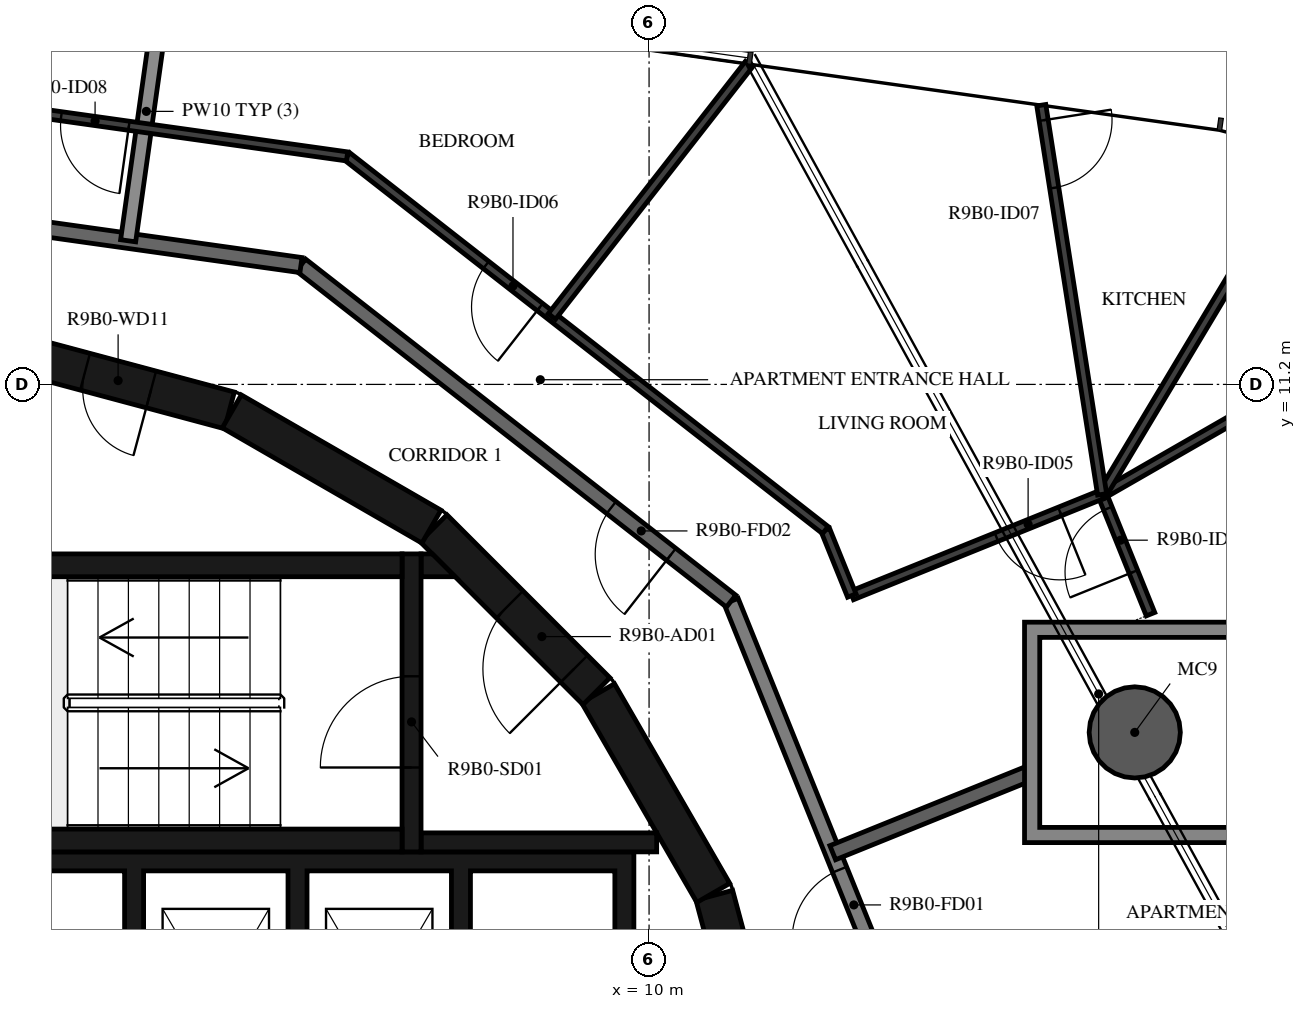
"""IFC4 building model, lengths in metres.
Left out: names, types, materials, properties, quantities, classifications, styles, units other than length and angle.
Written with IfcOpenShell. Run it as: python <this file> out.ifc"""

import sys

from ifc_helpers import new_model, si_unit, direction, frame, frame_2d, origin, origin_2d, place, context, subcontext, project, spatial, polyline, rectangle, hollow_circle, outline, extrude, element, fill, save


model = new_model("IFC4")
c1 = context("Model", 3, precision=1e-05, world=origin(), true_north=direction((0.0, 1.0)))
c2 = subcontext(c1, "Body", "Model", "MODEL_VIEW")
j1 = project(units=[si_unit("LENGTHUNIT", "METRE"), si_unit("PLANEANGLEUNIT", "RADIAN")], contexts=[c1])
p1 = place(None, origin())
s1 = spatial("IfcSite", under=j1, at=p1, CompositionType="ELEMENT")
p2 = place(p1, origin())
s2 = spatial("IfcBuilding", under=s1, at=p2, CompositionType="ELEMENT")
p3 = place(p2, frame((0.0, 0.0, 347.0)))
s3 = spatial("IfcBuildingStorey", under=s2, at=p3, CompositionType="ELEMENT", Elevation=347.0)
p4 = place(p3, frame((16.39, 6.622, -0.38), z_axis=(0.0, 0.0, 1.0), x_axis=(1.0, 0.0, 0.0)))
e1 = element("IfcColumn", 1, at=p4, inside=s3, PredefinedType="COLUMN", context=c2, shape_type="SweptSolid", body=[
    extrude(hollow_circle(Radius=0.6, WallThickness=0.03, at=origin_2d()), origin(), (0.0, 0.0, 1.0), 3.5),
])
for number, where, z_axis, x_axis in (
    (2, (11.643, 1.55, 0.0), (0.0, 0.0, 1.0), (-0.259, 0.966, 0.0)),
    (3, (10.845, 4.51, 0.0), (0.0, 0.0, 1.0), (-0.5, 0.866, 0.0)),
):
    element("IfcWall", number, at=place(p3, frame(where, z_axis=z_axis, x_axis=x_axis)), inside=s3, PredefinedType="SHEAR", context=c2, shape_type="SweptSolid", body=[
        extrude(rectangle(XDim=3.033, YDim=0.5, at=frame_2d((1.516, 0.0))), origin(), (0.0, 0.0, 1.0), 3.12),
    ])
p5 = place(p3, frame((9.308, 7.164, 0.0), z_axis=(0.0, 0.0, 1.0), x_axis=(-0.707106781187, 0.707106781187, 0.0)))
e4 = element("IfcWall", 4, at=p5, inside=s3, PredefinedType="SHEAR", context=c2, shape_type="SweptSolid", body=[
    extrude(rectangle(XDim=3.032, YDim=0.5, at=frame_2d((1.516, 0.0))), origin(), (0.0, 0.0, 1.0), 3.12),
])
p6 = place(p5, frame((0.416, 0.0, 0.0)))
e5 = element("IfcOpeningElement", 5, at=p6, cuts=e4, PredefinedType="OPENING", context=c2, shape_type="SweptSolid", body=[
    extrude(rectangle(XDim=1.2, YDim=2.1, at=frame_2d((0.6, 1.05))), frame((0.0, 0.26, 0.0), z_axis=(0.0, -1.0, 0.0), x_axis=(1.0, 0.0, 0.0)), (0.0, 0.0, 1.0), 0.52),
])
p7 = place(p3, frame((7.137, 9.329, 0.0), z_axis=(0.0, 0.0, 1.0), x_axis=(-0.865975092491, 0.500087131594, 0.0)))
e6 = element("IfcWall", 6, at=p7, inside=s3, PredefinedType="SHEAR", context=c2, shape_type="SweptSolid", body=[
    extrude(rectangle(XDim=3.033, YDim=0.5, at=frame_2d((1.516, 0.0))), origin(), (0.0, 0.0, 1.0), 3.12),
])
p8 = place(p3, frame((4.479, 10.858, 0.0), z_axis=(0.0, 0.0, 1.0), x_axis=(-0.965948410781, 0.258734743916, 0.0)))
e7 = element("IfcWall", 7, at=p8, inside=s3, PredefinedType="SHEAR", context=c2, shape_type="SweptSolid", body=[
    extrude(rectangle(XDim=3.033, YDim=0.5, at=frame_2d((1.516, 0.0))), origin(), (0.0, 0.0, 1.0), 3.12),
])
p9 = place(p8, frame((1.066, 0.0, 0.0)))
e8 = element("IfcOpeningElement", 8, at=p9, cuts=e7, PredefinedType="OPENING", context=c2, shape_type="SweptSolid", body=[
    extrude(rectangle(XDim=0.9, YDim=2.1, at=frame_2d((0.45, 1.05))), frame((0.0, 0.26, 0.0), z_axis=(0.0, -1.0, 0.0), x_axis=(1.0, 0.0, 0.0)), (0.0, 0.0, 1.0), 0.52),
])
for number, where, z_axis, x_axis in (
    (9, (0.0, 5.2, 0.0), (0.0, 0.0, 1.0), (1.0, 0.0, 0.0)),
    (10, (0.0, 8.82, 0.0), (0.0, 0.0, 1.0), (1.0, 0.0, 0.0)),
):
    element("IfcWall", number, at=place(p3, frame(where, z_axis=z_axis, x_axis=x_axis)), inside=s3, PredefinedType="SHEAR", context=c2, shape_type="SweptSolid", body=[
        extrude(rectangle(XDim=6.75, YDim=0.3, at=frame_2d((3.375, 0.0))), origin(), (0.0, 0.0, 1.0), 3.12),
    ])
p10 = place(p3, frame((6.875, 5.05, 0.0), z_axis=(0.0, 0.0, 1.0), x_axis=(0.0, 1.0, 0.0)))
e11 = element("IfcWall", 11, at=p10, inside=s3, PredefinedType="SHEAR", context=c2, shape_type="SweptSolid", body=[
    extrude(rectangle(XDim=3.92, YDim=0.25, at=frame_2d((1.96, 0.0))), origin(), (0.0, 0.0, 1.0), 3.12),
])
p11 = place(p10, frame((1.11, 0.0, 0.0)))
e12 = element("IfcOpeningElement", 12, at=p11, cuts=e11, PredefinedType="OPENING", context=c2, shape_type="SweptSolid", body=[
    extrude(rectangle(XDim=1.2, YDim=2.1, at=frame_2d((0.6, 1.05))), frame((0.0, 0.135, 0.0), z_axis=(0.0, -1.0, 0.0), x_axis=(1.0, 0.0, 0.0)), (0.0, 0.0, 1.0), 0.27),
])
p12 = place(p3, frame((7.0, 5.175, 0.0), z_axis=(0.0, 0.0, 1.0), x_axis=(1.0, 0.0, 0.0)))
e13 = element("IfcWall", 13, at=p12, inside=s3, PredefinedType="SHEAR", context=c2, shape_type="SweptSolid", body=[
    extrude(rectangle(XDim=3.1, YDim=0.25, at=frame_2d((1.55, 0.0))), origin(), (0.0, 0.0, 1.0), 3.12),
])
p13 = place(p3, origin())
e14 = element("IfcWall", 14, at=p13, inside=s3, PredefinedType="SHEAR", context=c2, shape_type="SweptSolid", body=[
    extrude(outline(polyline([(7.448, 8.67), (7.0, 8.67), (7.0, 8.97), (7.148, 8.97), (7.448, 8.67)])), origin(), (0.0, 0.0, 1.0), 3.12),
])
p14 = place(p3, origin())
e15 = element("IfcWall", 15, at=p14, inside=s3, PredefinedType="SHEAR", context=c2, shape_type="SweptSolid", body=[
    extrude(outline(polyline([(-9.8, 1.9), (-9.55, 1.9), (-9.55, 4.8), (-1.2, 4.8), (-1.2, 1.9), (-0.95, 1.9), (-0.95, 4.8), (3.1, 4.8), (3.1, 1.9), (3.35, 1.9), (3.35, 4.8), (5.25, 4.8), (5.25, 1.9), (5.5, 1.9), (5.5, 4.8), (7.4, 4.8), (7.4, 1.9), (7.65, 1.9), (7.65, 4.8), (9.55, 4.8), (9.55, 1.9), (9.8, 1.9), (9.8, 4.8), (9.8, 5.05), (-9.8, 5.05), (-9.8, 4.8), (-9.8, 1.9)])), origin(), (0.0, 0.0, 1.0), 3.12),
])
p15 = place(p3, frame((13.769, 1.691, 0.0), z_axis=(0.0, 0.0, 1.0), x_axis=(-0.374618189599, 0.92717916932, 0.0)))
e16 = element("IfcWall", 16, at=p15, inside=s3, PredefinedType="STANDARD", context=c2, shape_type="SweptSolid", body=[
    extrude(rectangle(XDim=7.181, YDim=0.2, at=frame_2d((3.591, 0.0))), origin(), (0.0, 0.0, 1.0), 3.12),
])
p16 = place(p15, frame((2.371, 0.0, 0.0)))
e17 = element("IfcOpeningElement", 17, at=p16, cuts=e16, PredefinedType="OPENING", context=c2, shape_type="SweptSolid", body=[
    extrude(rectangle(XDim=1.0, YDim=2.1, at=frame_2d((0.5, 1.05))), frame((0.0, 0.11, 0.0), z_axis=(0.0, -1.0, 0.0), x_axis=(1.0, 0.0, 0.0)), (0.0, 0.0, 1.0), 0.22),
])
p17 = place(p3, frame((11.079, 8.349, 0.0), z_axis=(0.0, 0.0, 1.0), x_axis=(-0.78800478687, 0.615669112324, 0.0)))
e18 = element("IfcWall", 18, at=p17, inside=s3, PredefinedType="STANDARD", context=c2, shape_type="SweptSolid", body=[
    extrude(rectangle(XDim=7.181, YDim=0.2, at=frame_2d((3.591, 0.0))), origin(), (0.0, 0.0, 1.0), 3.12),
])
p18 = place(p17, frame((1.0, 0.0, 0.0)))
e19 = element("IfcOpeningElement", 19, at=p18, cuts=e18, PredefinedType="OPENING", context=c2, shape_type="SweptSolid", body=[
    extrude(rectangle(XDim=1.0, YDim=2.1, at=frame_2d((0.5, 1.05))), frame((0.0, 0.11, 0.0), z_axis=(0.0, -1.0, 0.0), x_axis=(1.0, 0.0, 0.0)), (0.0, 0.0, 1.0), 0.22),
])
p19 = place(p3, frame((5.42, 12.77, 0.0), z_axis=(0.0, 0.0, 1.0), x_axis=(-0.990270565508, 0.139155334385, 0.0)))
e20 = element("IfcWall", 20, at=p19, inside=s3, PredefinedType="STANDARD", context=c2, shape_type="SweptSolid", body=[
    extrude(rectangle(XDim=7.181, YDim=0.2, at=frame_2d((3.59, 0.0))), origin(), (0.0, 0.0, 1.0), 3.12),
])
p20 = place(p3, frame((14.989, 6.079, 0.0), z_axis=(0.0, 0.0, 1.0), x_axis=(-0.927203056473, -0.374559063523, 0.0)))
e21 = element("IfcWall", 21, at=p20, inside=s3, PredefinedType="STANDARD", context=c2, shape_type="SweptSolid", body=[
    extrude(rectangle(XDim=2.775, YDim=0.2, at=frame_2d((1.387, 0.0))), origin(), (0.0, 0.0, 1.0), 3.12),
])
p21 = place(p3, frame((3.625, 16.494, 0.0), z_axis=(0.0, 0.0, 1.0), x_axis=(-0.139174320859, -0.990267897295, 0.0)))
e22 = element("IfcWall", 22, at=p21, inside=s3, PredefinedType="STANDARD", context=c2, shape_type="SweptSolid", body=[
    extrude(rectangle(XDim=3.438, YDim=0.2, at=frame_2d((1.719, 0.0))), origin(), (0.0, 0.0, 1.0), 2.73),
])
p22 = place(p3, frame((16.597, 8.177, 0.0), z_axis=(0.0, 0.0, 1.0), x_axis=(-0.374631609957, 0.927173746835, 0.0)))
e23 = element("IfcWall", 23, at=p22, inside=s3, PredefinedType="PARTITIONING", context=c2, shape_type="SweptSolid", body=[
    extrude(rectangle(XDim=1.7, YDim=0.12, at=frame_2d((0.85, 0.0))), origin(), (0.0, 0.0, 1.0), 3.12),
])
p23 = place(p22, frame((0.6, 0.0, 0.0)))
e24 = element("IfcOpeningElement", 24, at=p23, cuts=e23, PredefinedType="OPENING", context=c2, shape_type="SweptSolid", body=[
    extrude(rectangle(XDim=0.9, YDim=2.1, at=frame_2d((0.45, 1.05))), frame((0.0, 0.07, 0.0), z_axis=(0.0, -1.0, 0.0), x_axis=(1.0, 0.0, 0.0)), (0.0, 0.0, 1.0), 0.14),
])
p24 = place(p3, frame((15.96, 9.753, 0.0), z_axis=(0.0, 0.0, 1.0), x_axis=(-0.927148174805, -0.37469489182, 0.0)))
e25 = element("IfcWall", 25, at=p24, inside=s3, PredefinedType="PARTITIONING", context=c2, shape_type="SweptSolid", body=[
    extrude(rectangle(XDim=3.552, YDim=0.12, at=frame_2d((1.776, 0.0))), origin(), (0.0, 0.0, 1.0), 3.12),
])
p25 = place(p24, frame((0.6, 0.0, 0.0)))
e26 = element("IfcOpeningElement", 26, at=p25, cuts=e25, PredefinedType="OPENING", context=c2, shape_type="SweptSolid", body=[
    extrude(rectangle(XDim=0.9, YDim=2.1, at=frame_2d((0.45, 1.05))), frame((0.0, 0.07, 0.0), z_axis=(0.0, -1.0, 0.0), x_axis=(1.0, 0.0, 0.0)), (0.0, 0.0, 1.0), 0.14),
])
p26 = place(p3, frame((12.667, 8.423, 0.0), z_axis=(0.0, 0.0, 1.0), x_axis=(-0.374697807675, 0.927146996395, 0.0)))
e27 = element("IfcWall", 27, at=p26, inside=s3, PredefinedType="PARTITIONING", context=c2, shape_type="SweptSolid", body=[
    extrude(rectangle(XDim=0.928, YDim=0.12, at=frame_2d((0.464, 0.0))), origin(), (0.0, 0.0, 1.0), 3.12),
])
p27 = place(p3, frame((12.319, 9.283, 0.0), z_axis=(0.0, 0.0, 1.0), x_axis=(-0.788000268464, 0.61567489546, 0.0)))
e28 = element("IfcWall", 28, at=p27, inside=s3, PredefinedType="PARTITIONING", context=c2, shape_type="SweptSolid", body=[
    extrude(rectangle(XDim=7.985, YDim=0.12, at=frame_2d((3.992, 0.0))), origin(), (0.0, 0.0, 1.0), 3.12),
])
p28 = place(p27, frame((4.765, 0.0, 0.0)))
e29 = element("IfcOpeningElement", 29, at=p28, cuts=e28, PredefinedType="OPENING", context=c2, shape_type="SweptSolid", body=[
    extrude(rectangle(XDim=0.9, YDim=2.1, at=frame_2d((0.45, 1.05))), frame((0.0, 0.07, 0.0), z_axis=(0.0, -1.0, 0.0), x_axis=(1.0, 0.0, 0.0)), (0.0, 0.0, 1.0), 0.14),
])
p29 = place(p3, frame((6.027, 14.199, 0.0), z_axis=(0.0, 0.0, 1.0), x_axis=(-0.990271593532, 0.139148018469, 0.0)))
e30 = element("IfcWall", 30, at=p29, inside=s3, PredefinedType="PARTITIONING", context=c2, shape_type="SweptSolid", body=[
    extrude(rectangle(XDim=7.985, YDim=0.12, at=frame_2d((3.992, 0.0))), origin(), (0.0, 0.0, 1.0), 3.12),
])
p30 = place(p29, frame((2.898, 0.0, 0.0)))
e31 = element("IfcOpeningElement", 31, at=p30, cuts=e30, PredefinedType="OPENING", context=c2, shape_type="SweptSolid", body=[
    extrude(rectangle(XDim=0.9, YDim=2.1, at=frame_2d((0.45, 1.05))), frame((0.0, 0.07, 0.0), z_axis=(0.0, -1.0, 0.0), x_axis=(1.0, 0.0, 0.0)), (0.0, 0.0, 1.0), 0.14),
])
p31 = place(p3, frame((21.343, 12.847, 0.0), z_axis=(0.0, 0.0, 1.0), x_axis=(-0.866974691568, -0.498352168832, 0.0)))
e32 = element("IfcWall", 32, at=p31, inside=s3, PredefinedType="PARTITIONING", context=c2, shape_type="SweptSolid", body=[
    extrude(rectangle(XDim=6.208, YDim=0.12, at=frame_2d((3.104, 0.0))), origin(), (0.0, 0.0, 1.0), 3.12),
])
p32 = place(p3, frame((18.649, 14.244, 0.0), z_axis=(0.0, 0.0, 1.0), x_axis=(-0.513782200586, -0.85792065505, 0.0)))
e33 = element("IfcWall", 33, at=p32, inside=s3, PredefinedType="PARTITIONING", context=c2, shape_type="SweptSolid", body=[
    extrude(rectangle(XDim=5.234, YDim=0.12, at=frame_2d((2.617, 0.0))), origin(), (0.0, 0.0, 1.0), 3.12),
])
p33 = place(p32, frame((0.2, 0.0, 0.0)))
e34 = element("IfcOpeningElement", 34, at=p33, cuts=e33, PredefinedType="OPENING", context=c2, shape_type="SweptSolid", body=[
    extrude(rectangle(XDim=0.8, YDim=2.1, at=frame_2d((0.4, 1.05))), frame((0.0, 0.07, 0.0), z_axis=(0.0, -1.0, 0.0), x_axis=(1.0, 0.0, 0.0)), (0.0, 0.0, 1.0), 0.14),
])
p34 = place(p3, frame((15.16, 14.873, 0.0), z_axis=(0.0, 0.0, 1.0), x_axis=(0.154389815045, -0.988010012606, 0.0)))
e35 = element("IfcWall", 35, at=p34, inside=s3, PredefinedType="PARTITIONING", context=c2, shape_type="SweptSolid", body=[
    extrude(rectangle(XDim=5.182, YDim=0.12, at=frame_2d((2.591, 0.0))), origin(), (0.0, 0.0, 1.0), 3.12),
])
p35 = place(p34, frame((0.2, 0.0, 0.0)))
e36 = element("IfcOpeningElement", 36, at=p35, cuts=e35, PredefinedType="OPENING", context=c2, shape_type="SweptSolid", body=[
    extrude(rectangle(XDim=0.9, YDim=2.1, at=frame_2d((0.45, 1.05))), frame((0.0, 0.07, 0.0), z_axis=(0.0, -1.0, 0.0), x_axis=(1.0, 0.0, 0.0)), (0.0, 0.0, 1.0), 0.14),
])
p36 = place(p3, frame((11.315, 15.414, 0.0), z_axis=(0.0, 0.0, 1.0), x_axis=(-0.615656413137, -0.788014708596, 0.0)))
e37 = element("IfcWall", 37, at=p36, inside=s3, PredefinedType="PARTITIONING", context=c2, shape_type="SweptSolid", body=[
    extrude(rectangle(XDim=4.213, YDim=0.12, at=frame_2d((2.106, 0.0))), origin(), (0.0, 0.0, 1.0), 3.12),
])
p37 = place(p3, origin())
e38 = element("IfcWall", 38, at=p37, inside=s3, PredefinedType="STANDARD", context=c2, shape_type="SweptSolid", body=[
    extrude(outline(polyline([(17.84, 8.072), (17.84, 5.172), (14.94, 5.172), (14.94, 8.072), (17.84, 8.072)]), holes=[polyline([(15.14, 5.372), (17.64, 5.372), (17.64, 7.872), (15.14, 7.872), (15.14, 5.372)])]), origin(), (0.0, 0.0, 1.0), 3.12),
])
p38 = place(p11, origin())
e39 = element("IfcDoor", 39, at=p38, inside=s3, OperationType="SINGLE_SWING_LEFT", PredefinedType="DOOR", context=c2, shape_type="SweptSolid", body=[
    extrude(rectangle(XDim=1.2, YDim=2.1, at=frame_2d((0.6, 1.05))), frame((0.0, 0.025, 0.0), z_axis=(0.0, -1.0, 0.0), x_axis=(1.0, 0.0, 0.0)), (0.0, 0.0, 1.0), 0.05),
])
fill(e12, e39)
p39 = place(p6, origin())
e40 = element("IfcDoor", 40, at=p39, inside=s3, OperationType="SINGLE_SWING_RIGHT", PredefinedType="DOOR", context=c2, shape_type="SweptSolid", body=[
    extrude(rectangle(XDim=1.2, YDim=2.1, at=frame_2d((0.6, 1.05))), frame((0.0, 0.025, 0.0), z_axis=(0.0, -1.0, 0.0), x_axis=(1.0, 0.0, 0.0)), (0.0, 0.0, 1.0), 0.05),
])
fill(e5, e40)
p40 = place(p9, origin())
e41 = element("IfcDoor", 41, at=p40, inside=s3, OperationType="SINGLE_SWING_LEFT", PredefinedType="DOOR", context=c2, shape_type="SweptSolid", body=[
    extrude(rectangle(XDim=0.9, YDim=2.1, at=frame_2d((0.45, 1.05))), frame((0.0, 0.025, 0.0), z_axis=(0.0, -1.0, 0.0), x_axis=(1.0, 0.0, 0.0)), (0.0, 0.0, 1.0), 0.05),
])
fill(e8, e41)
p41 = place(p16, origin())
e42 = element("IfcDoor", 42, at=p41, inside=s3, OperationType="SINGLE_SWING_LEFT", PredefinedType="DOOR", context=c2, shape_type="SweptSolid", body=[
    extrude(rectangle(XDim=1.0, YDim=2.1, at=frame_2d((0.5, 1.05))), frame((0.0, 0.025, 0.0), z_axis=(0.0, -1.0, 0.0), x_axis=(1.0, 0.0, 0.0)), (0.0, 0.0, 1.0), 0.05),
])
fill(e17, e42)
p42 = place(p18, origin())
e43 = element("IfcDoor", 43, at=p42, inside=s3, OperationType="SINGLE_SWING_LEFT", PredefinedType="DOOR", context=c2, shape_type="SweptSolid", body=[
    extrude(rectangle(XDim=1.0, YDim=2.1, at=frame_2d((0.5, 1.05))), frame((0.0, 0.025, 0.0), z_axis=(0.0, -1.0, 0.0), x_axis=(1.0, 0.0, 0.0)), (0.0, 0.0, 1.0), 0.05),
])
fill(e19, e43)
p43 = place(p23, origin())
e44 = element("IfcDoor", 44, at=p43, inside=s3, OperationType="SINGLE_SWING_LEFT", PredefinedType="DOOR", context=c2, shape_type="SweptSolid", body=[
    extrude(rectangle(XDim=0.9, YDim=2.1, at=frame_2d((0.45, 1.05))), frame((0.0, 0.025, 0.0), z_axis=(0.0, -1.0, 0.0), x_axis=(1.0, 0.0, 0.0)), (0.0, 0.0, 1.0), 0.05),
])
fill(e24, e44)
p44 = place(p25, origin())
e45 = element("IfcDoor", 45, at=p44, inside=s3, OperationType="SINGLE_SWING_RIGHT", PredefinedType="DOOR", context=c2, shape_type="SweptSolid", body=[
    extrude(rectangle(XDim=0.9, YDim=2.1, at=frame_2d((0.45, 1.05))), frame((0.0, 0.025, 0.0), z_axis=(0.0, -1.0, 0.0), x_axis=(1.0, 0.0, 0.0)), (0.0, 0.0, 1.0), 0.05),
])
fill(e26, e45)
p45 = place(p28, origin())
e46 = element("IfcDoor", 46, at=p45, inside=s3, OperationType="SINGLE_SWING_LEFT", PredefinedType="DOOR", context=c2, shape_type="SweptSolid", body=[
    extrude(rectangle(XDim=0.9, YDim=2.1, at=frame_2d((0.45, 1.05))), frame((0.0, 0.025, 0.0), z_axis=(0.0, -1.0, 0.0), x_axis=(1.0, 0.0, 0.0)), (0.0, 0.0, 1.0), 0.05),
])
fill(e29, e46)
p46 = place(p35, origin())
e47 = element("IfcDoor", 47, at=p46, inside=s3, OperationType="SINGLE_SWING_LEFT", PredefinedType="DOOR", context=c2, shape_type="SweptSolid", body=[
    extrude(rectangle(XDim=0.9, YDim=2.1, at=frame_2d((0.45, 1.05))), frame((0.0, 0.025, 0.0), z_axis=(0.0, -1.0, 0.0), x_axis=(1.0, 0.0, 0.0)), (0.0, 0.0, 1.0), 0.05),
])
fill(e36, e47)
p47 = place(p30, origin())
e48 = element("IfcDoor", 48, at=p47, inside=s3, OperationType="SINGLE_SWING_LEFT", PredefinedType="DOOR", context=c2, shape_type="SweptSolid", body=[
    extrude(rectangle(XDim=0.9, YDim=2.1, at=frame_2d((0.45, 1.05))), frame((0.0, 0.025, 0.0), z_axis=(0.0, -1.0, 0.0), x_axis=(1.0, 0.0, 0.0)), (0.0, 0.0, 1.0), 0.05),
])
fill(e31, e48)
save(model, sys.argv[1])
